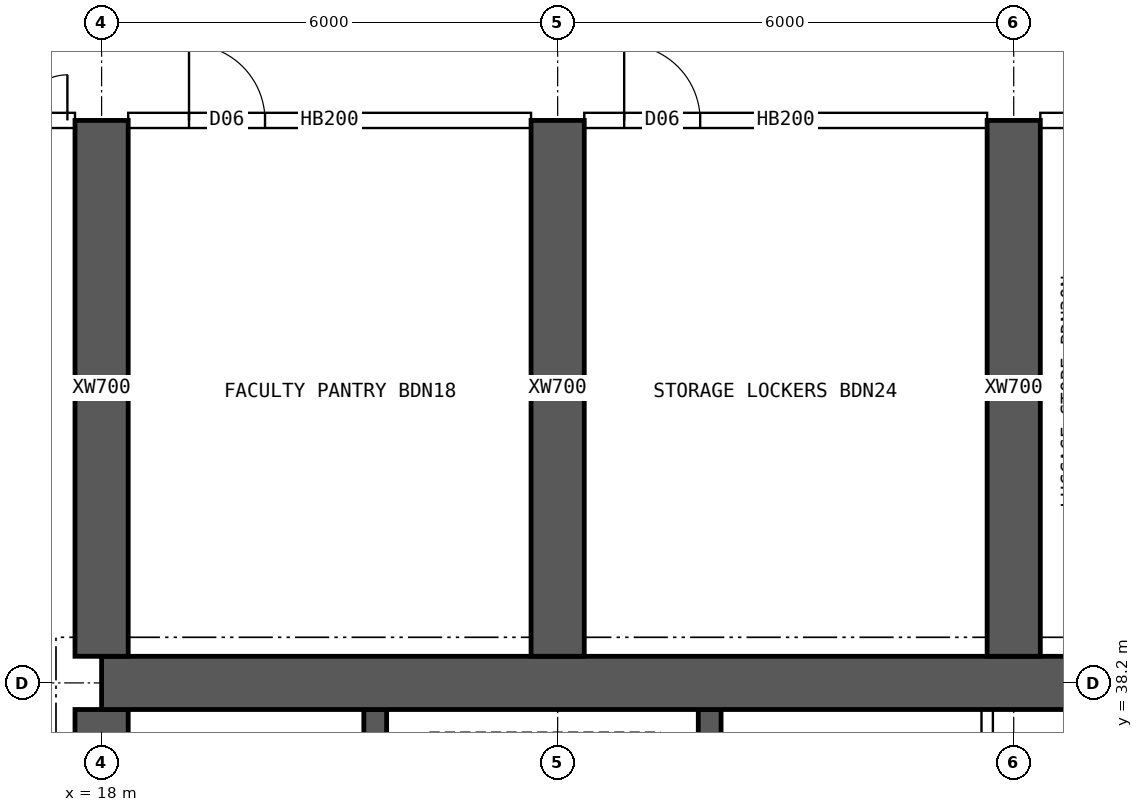
"""IFC4 building model, lengths in metres.
Left out: names, types, materials, properties, quantities, classifications, styles, units other than length and angle.
Written with IfcOpenShell. Run it as: python <this file> out.ifc"""

import sys

from ifc_helpers import new_model, si_unit, direction, frame, frame_2d, origin, place, context, subcontext, project, spatial, rectangle, extrude, element, fill, save


model = new_model("IFC4")
c1 = context("Model", 3, precision=1e-05, world=origin(), true_north=direction((0.0, 1.0)))
c2 = subcontext(c1, "Body", "Model", "MODEL_VIEW")
j1 = project(units=[si_unit("LENGTHUNIT", "METRE"), si_unit("PLANEANGLEUNIT", "RADIAN")], contexts=[c1])
p1 = place(None, origin())
s1 = spatial("IfcSite", under=j1, at=p1, CompositionType="ELEMENT")
p2 = place(p1, origin())
s2 = spatial("IfcBuilding", under=s1, at=p2, CompositionType="ELEMENT")
p3 = place(p2, frame((0.0, 0.0, 224.05)))
s3 = spatial("IfcBuildingStorey", under=s2, at=p3, CompositionType="ELEMENT", Elevation=224.05)
p4 = place(p3, frame((18.0, 38.2, 0.0), z_axis=(0.0, 0.0, 1.0), x_axis=(1.0, 0.0, 0.0)))
e1 = element("IfcWall", 1, at=p4, inside=s3, PredefinedType="SHEAR", context=c2, shape_type="SweptSolid", body=[
    extrude(rectangle(XDim=48.0, YDim=0.7, at=frame_2d((24.0, 0.0))), origin(), (0.0, 0.0, 1.0), 3.75),
])
p5 = place(p3, frame((18.0, 26.15, 0.0), z_axis=(0.0, 0.0, 1.0), x_axis=(0.0, 1.0, 0.0)))
e2 = element("IfcWall", 2, at=p5, inside=s3, PredefinedType="SHEAR", context=c2, shape_type="SweptSolid", body=[
    extrude(rectangle(XDim=11.7, YDim=0.7, at=frame_2d((5.85, 0.0))), origin(), (0.0, 0.0, 1.0), 3.75),
])
p6 = place(p5, frame((5.15, 0.0, 0.0)))
e3 = element("IfcOpeningElement", 3, at=p6, cuts=e2, PredefinedType="OPENING", context=c2, shape_type="SweptSolid", body=[
    extrude(rectangle(XDim=1.2, YDim=2.1, at=frame_2d((0.6, 1.05))), frame((0.0, 0.36, 0.0), z_axis=(0.0, -1.0, 0.0), x_axis=(1.0, 0.0, 0.0)), (0.0, 0.0, 1.0), 0.72),
])
for number, where, z_axis, x_axis in (
    (4, (21.6, 34.75, 0.0), (0.0, 0.0, 1.0), (0.0, 1.0, 0.0)),
    (5, (26.0, 34.75, 0.0), (0.0, 0.0, 1.0), (0.0, 1.0, 0.0)),
):
    element("IfcWall", number, at=place(p3, frame(where, z_axis=z_axis, x_axis=x_axis)), inside=s3, PredefinedType="SHEAR", context=c2, shape_type="SweptSolid", body=[
        extrude(rectangle(XDim=3.1, YDim=0.3, at=frame_2d((1.55, 0.0))), origin(), (0.0, 0.0, 1.0), 3.75),
    ])
for number, where, z_axis, x_axis in (
    (6, (18.0, 38.55, 0.0), (0.0, 0.0, 1.0), (0.0, 1.0, 0.0)),
    (7, (24.0, 38.55, 0.0), (0.0, 0.0, 1.0), (0.0, 1.0, 0.0)),
    (8, (30.0, 38.55, 0.0), (0.0, 0.0, 1.0), (0.0, 1.0, 0.0)),
):
    element("IfcWall", number, at=place(p3, frame(where, z_axis=z_axis, x_axis=x_axis)), inside=s3, PredefinedType="SHEAR", context=c2, shape_type="SweptSolid", body=[
        extrude(rectangle(XDim=7.05, YDim=0.7, at=frame_2d((3.525, 0.0))), origin(), (0.0, 0.0, 1.0), 3.75),
    ])
p7 = place(p3, frame((29.651, 34.75, 0.0), z_axis=(0.0, 0.0, 1.0), x_axis=(0.0, 1.0, 0.0)))
e9 = element("IfcWall", 9, at=p7, inside=s3, PredefinedType="SOLIDWALL", context=c2, shape_type="SweptSolid", body=[
    extrude(rectangle(XDim=3.1, YDim=0.15, at=frame_2d((1.55, 0.0))), origin(), (0.0, 0.0, 1.0), 3.5),
])
p8 = place(p3, frame((15.6, 45.6, 0.0), z_axis=(0.0, 0.0, 1.0), x_axis=(1.0, 0.0, 0.0)))
e10 = element("IfcWall", 10, at=p8, inside=s3, PredefinedType="SOLIDWALL", context=c2, shape_type="SweptSolid", body=[
    extrude(rectangle(XDim=2.05, YDim=0.2, at=frame_2d((1.025, 0.0))), origin(), (0.0, 0.0, 1.0), 3.5),
])
p9 = place(p8, frame((0.75, 0.0, 0.0)))
e11 = element("IfcOpeningElement", 11, at=p9, cuts=e10, PredefinedType="OPENING", context=c2, shape_type="SweptSolid", body=[
    extrude(rectangle(XDim=1.2, YDim=2.1, at=frame_2d((0.6, 1.05))), frame((0.0, 0.11, 0.0), z_axis=(0.0, -1.0, 0.0), x_axis=(1.0, 0.0, 0.0)), (0.0, 0.0, 1.0), 0.22),
])
p10 = place(p3, frame((18.35, 45.6, 0.0), z_axis=(0.0, 0.0, 1.0), x_axis=(1.0, 0.0, 0.0)))
e12 = element("IfcWall", 12, at=p10, inside=s3, PredefinedType="SOLIDWALL", context=c2, shape_type="SweptSolid", body=[
    extrude(rectangle(XDim=5.3, YDim=0.2, at=frame_2d((2.65, 0.0))), origin(), (0.0, 0.0, 1.0), 3.5),
])
p11 = place(p10, frame((0.8, 0.0, 0.0)))
e13 = element("IfcOpeningElement", 13, at=p11, cuts=e12, PredefinedType="OPENING", context=c2, shape_type="SweptSolid", body=[
    extrude(rectangle(XDim=1.0, YDim=2.1, at=frame_2d((0.5, 1.05))), frame((0.0, 0.11, 0.0), z_axis=(0.0, -1.0, 0.0), x_axis=(1.0, 0.0, 0.0)), (0.0, 0.0, 1.0), 0.22),
])
p12 = place(p3, frame((24.35, 45.6, 0.0), z_axis=(0.0, 0.0, 1.0), x_axis=(1.0, 0.0, 0.0)))
e14 = element("IfcWall", 14, at=p12, inside=s3, PredefinedType="SOLIDWALL", context=c2, shape_type="SweptSolid", body=[
    extrude(rectangle(XDim=5.3, YDim=0.2, at=frame_2d((2.65, 0.0))), origin(), (0.0, 0.0, 1.0), 3.5),
])
p13 = place(p12, frame((0.525, 0.0, 0.0)))
e15 = element("IfcOpeningElement", 15, at=p13, cuts=e14, PredefinedType="OPENING", context=c2, shape_type="SweptSolid", body=[
    extrude(rectangle(XDim=1.0, YDim=2.1, at=frame_2d((0.5, 1.05))), frame((0.0, 0.11, 0.0), z_axis=(0.0, -1.0, 0.0), x_axis=(1.0, 0.0, 0.0)), (0.0, 0.0, 1.0), 0.22),
])
p14 = place(p3, frame((30.35, 45.6, 0.0), z_axis=(0.0, 0.0, 1.0), x_axis=(1.0, 0.0, 0.0)))
e16 = element("IfcWall", 16, at=p14, inside=s3, PredefinedType="SOLIDWALL", context=c2, shape_type="SweptSolid", body=[
    extrude(rectangle(XDim=5.3, YDim=0.2, at=frame_2d((2.65, 0.0))), origin(), (0.0, 0.0, 1.0), 3.5),
])
p15 = place(p14, frame((0.35, 0.0, 0.0)))
e17 = element("IfcOpeningElement", 17, at=p15, cuts=e16, PredefinedType="OPENING", context=c2, shape_type="SweptSolid", body=[
    extrude(rectangle(XDim=0.9, YDim=2.1, at=frame_2d((0.45, 1.05))), frame((0.0, 0.11, 0.0), z_axis=(0.0, -1.0, 0.0), x_axis=(1.0, 0.0, 0.0)), (0.0, 0.0, 1.0), 0.22),
])
p16 = place(p14, frame((2.385, 0.0, 0.0)))
e18 = element("IfcOpeningElement", 18, at=p16, cuts=e16, PredefinedType="OPENING", context=c2, shape_type="SweptSolid", body=[
    extrude(rectangle(XDim=0.9, YDim=2.1, at=frame_2d((0.45, 1.05))), frame((0.0, 0.11, 0.0), z_axis=(0.0, -1.0, 0.0), x_axis=(1.0, 0.0, 0.0)), (0.0, 0.0, 1.0), 0.22),
])
p17 = place(p9, origin())
e19 = element("IfcDoor", 19, at=p17, inside=s3, OperationType="DOUBLE_DOOR_SINGLE_SWING", PredefinedType="DOOR", context=c2, shape_type="SweptSolid", body=[
    extrude(rectangle(XDim=1.2, YDim=2.1, at=frame_2d((0.6, 1.05))), frame((0.0, 0.025, 0.0), z_axis=(0.0, -1.0, 0.0), x_axis=(1.0, 0.0, 0.0)), (0.0, 0.0, 1.0), 0.05),
])
fill(e11, e19)
p18 = place(p11, origin())
e20 = element("IfcDoor", 20, at=p18, inside=s3, OperationType="SINGLE_SWING_LEFT", PredefinedType="DOOR", context=c2, shape_type="SweptSolid", body=[
    extrude(rectangle(XDim=1.0, YDim=2.1, at=frame_2d((0.5, 1.05))), frame((0.0, 0.025, 0.0), z_axis=(0.0, -1.0, 0.0), x_axis=(1.0, 0.0, 0.0)), (0.0, 0.0, 1.0), 0.05),
])
fill(e13, e20)
p19 = place(p13, origin())
e21 = element("IfcDoor", 21, at=p19, inside=s3, OperationType="SINGLE_SWING_LEFT", PredefinedType="DOOR", context=c2, shape_type="SweptSolid", body=[
    extrude(rectangle(XDim=1.0, YDim=2.1, at=frame_2d((0.5, 1.05))), frame((0.0, 0.025, 0.0), z_axis=(0.0, -1.0, 0.0), x_axis=(1.0, 0.0, 0.0)), (0.0, 0.0, 1.0), 0.05),
])
fill(e15, e21)
save(model, sys.argv[1])
